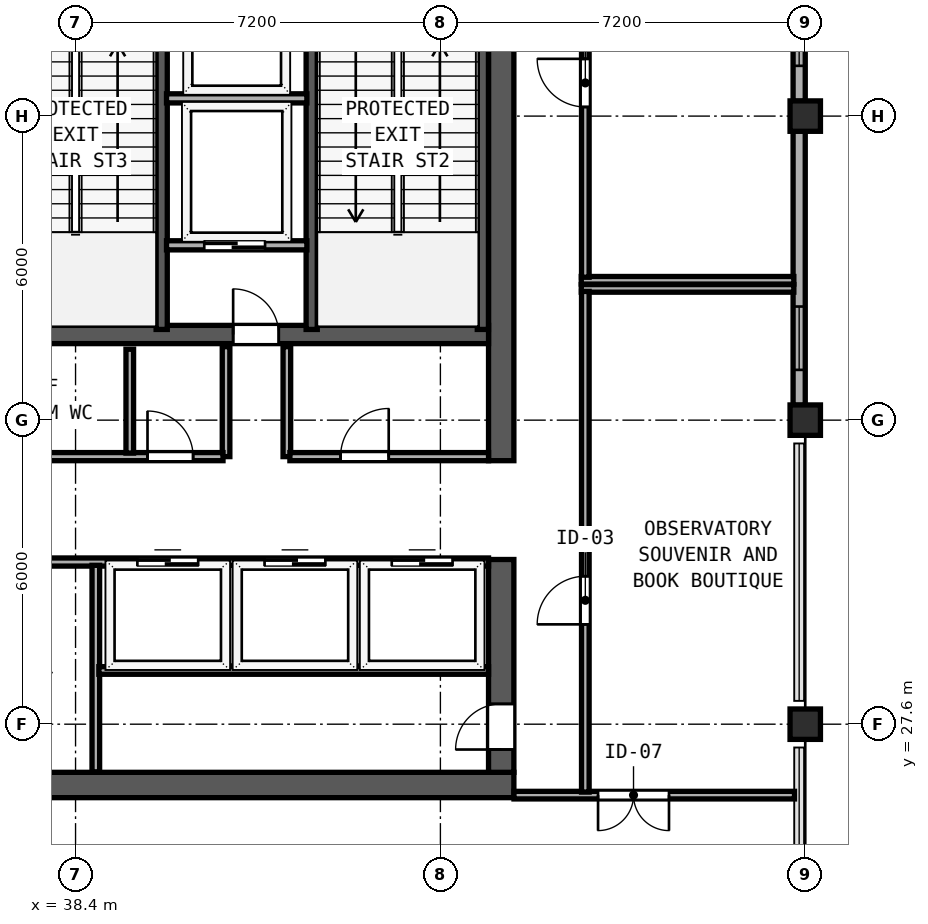
"""IFC4 building model, lengths in metres.
Left out: names, types, materials, properties, quantities, classifications, styles, units other than length and angle.
Written with IfcOpenShell. Run it as: python <this file> out.ifc"""

import sys

from ifc_helpers import new_model, si_unit, direction, frame, frame_2d, origin, origin_2d, place, context, subcontext, project, spatial, rectangle, hollow_rectangle, extrude, element, fill, save


model = new_model("IFC4")
c1 = context("Model", 3, precision=1e-05, world=origin(), true_north=direction((0.0, 1.0)))
c2 = subcontext(c1, "Body", "Model", "MODEL_VIEW")
j1 = project(units=[si_unit("LENGTHUNIT", "METRE"), si_unit("PLANEANGLEUNIT", "RADIAN")], contexts=[c1])
p1 = place(None, origin())
s1 = spatial("IfcSite", under=j1, at=p1, CompositionType="ELEMENT")
p2 = place(p1, origin())
s2 = spatial("IfcBuilding", under=s1, at=p2, CompositionType="ELEMENT")
p3 = place(p2, frame((0.0, 0.0, 318.2)))
s3 = spatial("IfcBuildingStorey", under=s2, at=p3, CompositionType="ELEMENT", Elevation=318.2)
p4 = place(p3, frame((29.75, 26.4, 0.0), z_axis=(0.0, 0.0, 1.0), x_axis=(1.0, 0.0, 0.0)))
e1 = element("IfcWall", 1, at=p4, inside=s3, PredefinedType="SHEAR", context=c2, shape_type="SweptSolid", body=[
    extrude(rectangle(XDim=17.3, YDim=0.5, at=frame_2d((8.65, 0.0))), origin(), (0.0, 0.0, 1.0), 4.76),
])
p5 = place(p3, frame((46.8, 26.65, 0.0), z_axis=(0.0, 0.0, 1.0), x_axis=(0.0, 1.0, 0.0)))
e2 = element("IfcWall", 2, at=p5, inside=s3, PredefinedType="SHEAR", context=c2, shape_type="SweptSolid", body=[
    extrude(rectangle(XDim=4.2, YDim=0.5, at=frame_2d((2.1, 0.0))), origin(), (0.0, 0.0, 1.0), 4.76),
])
p6 = place(p5, frame((1.35, 0.0, 0.0), z_axis=(0.0, 0.0, 1.0), x_axis=(-1.0, 0.0, 0.0)))
e3 = element("IfcOpeningElement", 3, at=p6, cuts=e2, PredefinedType="OPENING", context=c2, shape_type="SweptSolid", body=[
    extrude(rectangle(XDim=0.9, YDim=2.1, at=frame_2d((0.45, 1.05))), frame((0.0, 0.26, 0.0), z_axis=(0.0, -1.0, 0.0), x_axis=(1.0, 0.0, 0.0)), (0.0, 0.0, 1.0), 0.52),
])
p7 = place(p3, frame((46.8, 32.8, 0.0), z_axis=(0.0, 0.0, 1.0), x_axis=(0.0, 1.0, 0.0)))
e4 = element("IfcWall", 4, at=p7, inside=s3, PredefinedType="SHEAR", context=c2, shape_type="SweptSolid", body=[
    extrude(rectangle(XDim=10.15, YDim=0.5, at=frame_2d((5.075, 0.0))), origin(), (0.0, 0.0, 1.0), 4.76),
])
p8 = place(p3, frame((30.25, 35.29, 0.0), z_axis=(0.0, 0.0, 1.0), x_axis=(1.0, 0.0, 0.0)))
e5 = element("IfcWall", 5, at=p8, inside=s3, PredefinedType="SHEAR", context=c2, shape_type="SweptSolid", body=[
    extrude(rectangle(XDim=16.3, YDim=0.36, at=frame_2d((8.15, 0.0))), origin(), (0.0, 0.0, 1.0), 4.76),
])
p9 = place(p8, frame((5.1, 0.0, 0.0), z_axis=(0.0, 0.0, 1.0), x_axis=(-1.0, 0.0, 0.0)))
e6 = element("IfcOpeningElement", 6, at=p9, cuts=e5, PredefinedType="OPENING", context=c2, shape_type="SweptSolid", body=[
    extrude(rectangle(XDim=0.9, YDim=2.1, at=frame_2d((0.45, 1.05))), frame((0.0, 0.19, 0.0), z_axis=(0.0, -1.0, 0.0), x_axis=(1.0, 0.0, 0.0)), (0.0, 0.0, 1.0), 0.38),
])
p10 = place(p8, frame((12.16, 0.0, 0.0), z_axis=(0.0, 0.0, 1.0), x_axis=(-1.0, 0.0, 0.0)))
e7 = element("IfcOpeningElement", 7, at=p10, cuts=e5, PredefinedType="OPENING", context=c2, shape_type="SweptSolid", body=[
    extrude(rectangle(XDim=0.9, YDim=2.1, at=frame_2d((0.45, 1.05))), frame((0.0, 0.19, 0.0), z_axis=(0.0, -1.0, 0.0), x_axis=(1.0, 0.0, 0.0)), (0.0, 0.0, 1.0), 0.38),
])
for number, where, z_axis, x_axis in (
    (8, (40.1, 35.39, 0.0), (0.0, 0.0, 1.0), (0.0, 1.0, 0.0)),
    (9, (43.06, 35.39, 0.0), (0.0, 0.0, 1.0), (0.0, 1.0, 0.0)),
    (10, (46.438, 35.39, 0.0), (0.0, 0.0, 1.0), (0.0, 1.0, 0.0)),
):
    element("IfcWall", number, at=place(p3, frame(where, z_axis=z_axis, x_axis=x_axis)), inside=s3, PredefinedType="SHEAR", context=c2, shape_type="SweptSolid", body=[
        extrude(rectangle(XDim=7.56, YDim=0.22, at=frame_2d((3.78, 0.0))), origin(), (0.0, 0.0, 1.0), 4.76),
    ])
for number, where, z_axis, x_axis in (
    (11, (52.8, 33.6, 0.0), (0.0, 0.0, 1.0), (1.0, 0.0, 0.0)),
    (12, (52.8, 27.6, 0.0), (0.0, 0.0, 1.0), (1.0, 0.0, 0.0)),
    (13, (52.8, 39.6, 0.0), (0.0, 0.0, 1.0), (1.0, 0.0, 0.0)),
):
    element("IfcColumn", number, at=place(p3, frame(where, z_axis=z_axis, x_axis=x_axis)), inside=s3, PredefinedType="COLUMN", context=c2, shape_type="SweptSolid", body=[
        extrude(hollow_rectangle(XDim=0.6, YDim=0.6, WallThickness=0.024, at=origin_2d()), origin(), (0.0, 0.0, 1.0), 5.0),
    ])
p11 = place(p3, frame((52.68, 33.892, 0.0), z_axis=(0.0, 0.0, 1.0), x_axis=(0.0, 1.0, 0.0)))
e14 = element("IfcWall", 14, at=p11, inside=s3, PredefinedType="SOLIDWALL", context=c2, shape_type="SweptSolid", body=[
    extrude(rectangle(XDim=5.416, YDim=0.24, at=frame_2d((2.708, 0.0))), origin(), (0.0, 0.0, 1.0), 4.355),
])
p12 = place(p11, frame((0.7, 0.0, 0.85)))
e15 = element("IfcOpeningElement", 15, at=p12, cuts=e14, PredefinedType="OPENING", context=c2, shape_type="SweptSolid", body=[
    extrude(rectangle(XDim=1.25, YDim=1.95, at=frame_2d((0.625, 0.975))), frame((0.0, 0.13, 0.0), z_axis=(0.0, -1.0, 0.0), x_axis=(1.0, 0.0, 0.0)), (0.0, 0.0, 1.0), 0.26),
])
p13 = place(p3, frame((52.68, 39.892, 0.0), z_axis=(0.0, 0.0, 1.0), x_axis=(0.0, 1.0, 0.0)))
e16 = element("IfcWall", 16, at=p13, inside=s3, PredefinedType="SOLIDWALL", context=c2, shape_type="SweptSolid", body=[
    extrude(rectangle(XDim=5.416, YDim=0.24, at=frame_2d((2.708, 0.0))), origin(), (0.0, 0.0, 1.0), 4.355),
])
p14 = place(p13, frame((0.7, 0.0, 0.85)))
e17 = element("IfcOpeningElement", 17, at=p14, cuts=e16, PredefinedType="OPENING", context=c2, shape_type="SweptSolid", body=[
    extrude(rectangle(XDim=1.25, YDim=1.95, at=frame_2d((0.625, 0.975))), frame((0.0, 0.13, 0.0), z_axis=(0.0, -1.0, 0.0), x_axis=(1.0, 0.0, 0.0)), (0.0, 0.0, 1.0), 0.26),
])
p15 = place(p3, frame((40.195, 39.95, 0.0), z_axis=(0.0, 0.0, 1.0), x_axis=(1.0, 0.0, 0.0)))
e18 = element("IfcWall", 18, at=p15, inside=s3, PredefinedType="SOLIDWALL", context=c2, shape_type="SweptSolid", body=[
    extrude(rectangle(XDim=2.77, YDim=0.18, at=frame_2d((1.385, 0.0))), origin(), (0.0, 0.0, 1.0), 4.76),
])
p16 = place(p3, frame((40.195, 37.05, 0.0), z_axis=(0.0, 0.0, 1.0), x_axis=(1.0, 0.0, 0.0)))
e19 = element("IfcWall", 19, at=p16, inside=s3, PredefinedType="SOLIDWALL", context=c2, shape_type="SweptSolid", body=[
    extrude(rectangle(XDim=2.77, YDim=0.18, at=frame_2d((1.385, 0.0))), origin(), (0.0, 0.0, 1.0), 4.76),
])
p17 = place(p16, frame((1.945, 0.0, 0.0), z_axis=(0.0, 0.0, 1.0), x_axis=(-1.0, 0.0, 0.0)))
e20 = element("IfcOpeningElement", 20, at=p17, cuts=e19, PredefinedType="OPENING", context=c2, shape_type="SweptSolid", body=[
    extrude(rectangle(XDim=1.2, YDim=2.2, at=frame_2d((0.6, 1.1))), frame((0.0, 0.1, 0.0), z_axis=(0.0, -1.0, 0.0), x_axis=(1.0, 0.0, 0.0)), (0.0, 0.0, 1.0), 0.2),
])
for number, where, z_axis, x_axis in (
    (21, (41.37, 32.88, 0.0), (0.0, 0.0, 1.0), (0.0, 1.0, 0.0)),
    (22, (42.57, 32.88, 0.0), (0.0, 0.0, 1.0), (0.0, 1.0, 0.0)),
):
    element("IfcWall", number, at=place(p3, frame(where, z_axis=z_axis, x_axis=x_axis)), inside=s3, PredefinedType="SOLIDWALL", context=c2, shape_type="SweptSolid", body=[
        extrude(rectangle(XDim=2.17, YDim=0.15, at=frame_2d((1.085, 0.0))), origin(), (0.0, 0.0, 1.0), 4.76),
    ])
p18 = place(p3, frame((35.57, 32.88, 0.0), z_axis=(0.0, 0.0, 1.0), x_axis=(1.0, 0.0, 0.0)))
e23 = element("IfcWall", 23, at=p18, inside=s3, PredefinedType="SOLIDWALL", context=c2, shape_type="SweptSolid", body=[
    extrude(rectangle(XDim=5.74, YDim=0.16, at=frame_2d((2.87, 0.0))), origin(), (0.0, 0.0, 1.0), 4.76),
])
p19 = place(p18, frame((1.49, 0.0, 0.0), z_axis=(0.0, 0.0, 1.0), x_axis=(-1.0, 0.0, 0.0)))
e24 = element("IfcOpeningElement", 24, at=p19, cuts=e23, PredefinedType="OPENING", context=c2, shape_type="SweptSolid", body=[
    extrude(rectangle(XDim=0.95, YDim=2.12, at=frame_2d((0.475, 1.06))), frame((0.0, 0.09, 0.0), z_axis=(0.0, -1.0, 0.0), x_axis=(1.0, 0.0, 0.0)), (0.0, 0.0, 1.0), 0.18),
])
p20 = place(p18, frame((5.15, 0.0, 0.0), z_axis=(0.0, 0.0, 1.0), x_axis=(-1.0, 0.0, 0.0)))
e25 = element("IfcOpeningElement", 25, at=p20, cuts=e23, PredefinedType="OPENING", context=c2, shape_type="SweptSolid", body=[
    extrude(rectangle(XDim=0.9, YDim=2.1, at=frame_2d((0.45, 1.05))), frame((0.0, 0.09, 0.0), z_axis=(0.0, -1.0, 0.0), x_axis=(1.0, 0.0, 0.0)), (0.0, 0.0, 1.0), 0.18),
])
p21 = place(p3, frame((42.63, 32.88, 0.0), z_axis=(0.0, 0.0, 1.0), x_axis=(1.0, 0.0, 0.0)))
e26 = element("IfcWall", 26, at=p21, inside=s3, PredefinedType="SOLIDWALL", context=c2, shape_type="SweptSolid", body=[
    extrude(rectangle(XDim=3.92, YDim=0.16, at=frame_2d((1.96, 0.0))), origin(), (0.0, 0.0, 1.0), 4.76),
])
p22 = place(p21, frame((1.95, 0.0, 0.0), z_axis=(0.0, 0.0, 1.0), x_axis=(-1.0, 0.0, 0.0)))
e27 = element("IfcOpeningElement", 27, at=p22, cuts=e26, PredefinedType="OPENING", context=c2, shape_type="SweptSolid", body=[
    extrude(rectangle(XDim=0.95, YDim=2.12, at=frame_2d((0.475, 1.06))), frame((0.0, 0.09, 0.0), z_axis=(0.0, -1.0, 0.0), x_axis=(1.0, 0.0, 0.0)), (0.0, 0.0, 1.0), 0.18),
])
p23 = place(p3, frame((39.47, 32.95, 0.0), z_axis=(0.0, 0.0, 1.0), x_axis=(0.0, 1.0, 0.0)))
e28 = element("IfcWall", 28, at=p23, inside=s3, PredefinedType="SOLIDWALL", context=c2, shape_type="SweptSolid", body=[
    extrude(rectangle(XDim=2.05, YDim=0.15, at=frame_2d((1.025, 0.0))), origin(), (0.0, 0.0, 1.0), 4.76),
])
p24 = place(p3, frame((30.25, 30.8, 0.0), z_axis=(0.0, 0.0, 1.0), x_axis=(1.0, 0.0, 0.0)))
e29 = element("IfcWall", 29, at=p24, inside=s3, PredefinedType="SOLIDWALL", context=c2, shape_type="SweptSolid", body=[
    extrude(rectangle(XDim=16.3, YDim=0.16, at=frame_2d((8.15, 0.0))), origin(), (0.0, 0.0, 1.0), 4.76),
])
p25 = place(p24, frame((0.75, 0.0, 0.0)))
e30 = element("IfcOpeningElement", 30, at=p25, cuts=e29, PredefinedType="OPENING", context=c2, shape_type="SweptSolid", body=[
    extrude(rectangle(XDim=0.95, YDim=2.12, at=frame_2d((0.475, 1.06))), frame((0.0, 0.09, 0.0), z_axis=(0.0, -1.0, 0.0), x_axis=(1.0, 0.0, 0.0)), (0.0, 0.0, 1.0), 0.18),
])
p26 = place(p24, frame((3.4, 0.0, 0.0)))
e31 = element("IfcOpeningElement", 31, at=p26, cuts=e29, PredefinedType="OPENING", context=c2, shape_type="SweptSolid", body=[
    extrude(rectangle(XDim=0.95, YDim=2.12, at=frame_2d((0.475, 1.06))), frame((0.0, 0.09, 0.0), z_axis=(0.0, -1.0, 0.0), x_axis=(1.0, 0.0, 0.0)), (0.0, 0.0, 1.0), 0.18),
])
p27 = place(p24, frame((6.25, 0.0, 0.0)))
e32 = element("IfcOpeningElement", 32, at=p27, cuts=e29, PredefinedType="OPENING", context=c2, shape_type="SweptSolid", body=[
    extrude(rectangle(XDim=0.95, YDim=2.12, at=frame_2d((0.475, 1.06))), frame((0.0, 0.09, 0.0), z_axis=(0.0, -1.0, 0.0), x_axis=(1.0, 0.0, 0.0)), (0.0, 0.0, 1.0), 0.18),
])
p28 = place(p24, frame((9.37, 0.0, 0.0)))
e33 = element("IfcOpeningElement", 33, at=p28, cuts=e29, PredefinedType="OPENING", context=c2, shape_type="SweptSolid", body=[
    extrude(rectangle(XDim=1.2, YDim=2.2, at=frame_2d((0.6, 1.1))), frame((0.0, 0.09, 0.0), z_axis=(0.0, -1.0, 0.0), x_axis=(1.0, 0.0, 0.0)), (0.0, 0.0, 1.0), 0.18),
])
p29 = place(p24, frame((11.88, 0.0, 0.0)))
e34 = element("IfcOpeningElement", 34, at=p29, cuts=e29, PredefinedType="OPENING", context=c2, shape_type="SweptSolid", body=[
    extrude(rectangle(XDim=1.2, YDim=2.2, at=frame_2d((0.6, 1.1))), frame((0.0, 0.09, 0.0), z_axis=(0.0, -1.0, 0.0), x_axis=(1.0, 0.0, 0.0)), (0.0, 0.0, 1.0), 0.18),
])
p30 = place(p24, frame((14.39, 0.0, 0.0)))
e35 = element("IfcOpeningElement", 35, at=p30, cuts=e29, PredefinedType="OPENING", context=c2, shape_type="SweptSolid", body=[
    extrude(rectangle(XDim=1.2, YDim=2.2, at=frame_2d((0.6, 1.1))), frame((0.0, 0.09, 0.0), z_axis=(0.0, -1.0, 0.0), x_axis=(1.0, 0.0, 0.0)), (0.0, 0.0, 1.0), 0.18),
])
p31 = place(p3, frame((38.8, 26.66, 0.0), z_axis=(0.0, 0.0, 1.0), x_axis=(0.0, 1.0, 0.0)))
e36 = element("IfcWall", 36, at=p31, inside=s3, PredefinedType="SOLIDWALL", context=c2, shape_type="SweptSolid", body=[
    extrude(rectangle(XDim=4.075, YDim=0.15, at=frame_2d((2.038, 0.0))), origin(), (0.0, 0.0, 1.0), 4.76),
])
p32 = place(p3, frame((38.86, 28.66, 0.0), z_axis=(0.0, 0.0, 1.0), x_axis=(1.0, 0.0, 0.0)))
e37 = element("IfcWall", 37, at=p32, inside=s3, PredefinedType="PARTITIONING", context=c2, shape_type="SweptSolid", body=[
    extrude(rectangle(XDim=7.69, YDim=0.15, at=frame_2d((3.845, 0.0))), origin(), (0.0, 0.0, 1.0), 4.76),
])
for number, where, z_axis, x_axis in (
    (38, (41.47, 28.75, 0.0), (0.0, 0.0, 1.0), (0.0, 1.0, 0.0)),
    (39, (43.98, 28.75, 0.0), (0.0, 0.0, 1.0), (0.0, 1.0, 0.0)),
):
    element("IfcWall", number, at=place(p3, frame(where, z_axis=z_axis, x_axis=x_axis)), inside=s3, PredefinedType="SOLIDWALL", context=c2, shape_type="SweptSolid", body=[
        extrude(rectangle(XDim=1.985, YDim=0.15, at=frame_2d((0.993, 0.0))), origin(), (0.0, 0.0, 1.0), 4.76),
    ])
p33 = place(p3, frame((47.052, 26.2, 0.0), z_axis=(0.0, 0.0, 1.0), x_axis=(1.0, 0.0, 0.0)))
e40 = element("IfcWall", 40, at=p33, inside=s3, PredefinedType="PARTITIONING", context=c2, shape_type="SweptSolid", body=[
    extrude(rectangle(XDim=5.536, YDim=0.15, at=frame_2d((2.768, 0.0))), origin(), (0.0, 0.0, 1.0), 4.76),
])
p34 = place(p33, frame((3.059, 0.0, 0.0), z_axis=(0.0, 0.0, 1.0), x_axis=(-1.0, 0.0, 0.0)))
e41 = element("IfcOpeningElement", 41, at=p34, cuts=e40, PredefinedType="OPENING", context=c2, shape_type="SweptSolid", body=[
    extrude(rectangle(XDim=1.4, YDim=2.18, at=frame_2d((0.7, 1.09))), frame((0.0, 0.085, 0.0), z_axis=(0.0, -1.0, 0.0), x_axis=(1.0, 0.0, 0.0)), (0.0, 0.0, 1.0), 0.17),
])
p35 = place(p3, frame((48.38, 36.2, 0.0), z_axis=(0.0, 0.0, 1.0), x_axis=(1.0, 0.0, 0.0)))
e42 = element("IfcWall", 42, at=p35, inside=s3, PredefinedType="PARTITIONING", context=c2, shape_type="SweptSolid", body=[
    extrude(rectangle(XDim=4.195, YDim=0.15, at=frame_2d((2.098, 0.0))), origin(), (0.0, 0.0, 1.0), 4.76),
])
p36 = place(p3, frame((48.46, 26.26, 0.0), z_axis=(0.0, 0.0, 1.0), x_axis=(0.0, 1.0, 0.0)))
e43 = element("IfcWall", 43, at=p36, inside=s3, PredefinedType="PARTITIONING", context=c2, shape_type="SweptSolid", body=[
    extrude(rectangle(XDim=9.88, YDim=0.15, at=frame_2d((4.94, 0.0))), origin(), (0.0, 0.0, 1.0), 4.76),
])
p37 = place(p36, frame((3.31, 0.0, 0.0)))
e44 = element("IfcOpeningElement", 44, at=p37, cuts=e43, PredefinedType="OPENING", context=c2, shape_type="SweptSolid", body=[
    extrude(rectangle(XDim=0.95, YDim=2.12, at=frame_2d((0.475, 1.06))), frame((0.0, 0.085, 0.0), z_axis=(0.0, -1.0, 0.0), x_axis=(1.0, 0.0, 0.0)), (0.0, 0.0, 1.0), 0.17),
])
p38 = place(p3, frame((48.38, 36.36, 0.0), z_axis=(0.0, 0.0, 1.0), x_axis=(1.0, 0.0, 0.0)))
e45 = element("IfcWall", 45, at=p38, inside=s3, PredefinedType="PARTITIONING", context=c2, shape_type="SweptSolid", body=[
    extrude(rectangle(XDim=4.195, YDim=0.15, at=frame_2d((2.098, 0.0))), origin(), (0.0, 0.0, 1.0), 4.76),
])
p39 = place(p3, frame((48.46, 36.42, 0.0), z_axis=(0.0, 0.0, 1.0), x_axis=(0.0, 1.0, 0.0)))
e46 = element("IfcWall", 46, at=p39, inside=s3, PredefinedType="PARTITIONING", context=c2, shape_type="SweptSolid", body=[
    extrude(rectangle(XDim=11.2, YDim=0.15, at=frame_2d((5.6, 0.0))), origin(), (0.0, 0.0, 1.0), 4.76),
])
p40 = place(p39, frame((3.36, 0.0, 0.0)))
e47 = element("IfcOpeningElement", 47, at=p40, cuts=e46, PredefinedType="OPENING", context=c2, shape_type="SweptSolid", body=[
    extrude(rectangle(XDim=0.95, YDim=2.12, at=frame_2d((0.475, 1.06))), frame((0.0, 0.085, 0.0), z_axis=(0.0, -1.0, 0.0), x_axis=(1.0, 0.0, 0.0)), (0.0, 0.0, 1.0), 0.17),
])
p41 = place(p12, origin())
e48 = element("IfcWindow", 48, at=p41, inside=s3, PartitioningType="SINGLE_PANEL", PredefinedType="WINDOW", context=c2, shape_type="SweptSolid", body=[
    extrude(rectangle(XDim=1.25, YDim=1.95, at=frame_2d((0.625, 0.975))), frame((0.0, 0.03, 0.0), z_axis=(0.0, -1.0, 0.0), x_axis=(1.0, 0.0, 0.0)), (0.0, 0.0, 1.0), 0.06),
])
fill(e15, e48)
p42 = place(p14, origin())
e49 = element("IfcWindow", 49, at=p42, inside=s3, PartitioningType="SINGLE_PANEL", PredefinedType="WINDOW", context=c2, shape_type="SweptSolid", body=[
    extrude(rectangle(XDim=1.25, YDim=1.95, at=frame_2d((0.625, 0.975))), frame((0.0, 0.03, 0.0), z_axis=(0.0, -1.0, 0.0), x_axis=(1.0, 0.0, 0.0)), (0.0, 0.0, 1.0), 0.06),
])
fill(e17, e49)
p43 = place(p17, origin())
e50 = element("IfcDoor", 50, at=p43, inside=s3, OperationType="SLIDING_TO_RIGHT", PredefinedType="DOOR", context=c2, shape_type="SweptSolid", body=[
    extrude(rectangle(XDim=1.2, YDim=2.2, at=frame_2d((0.6, 1.1))), frame((0.0, 0.025, 0.0), z_axis=(0.0, -1.0, 0.0), x_axis=(1.0, 0.0, 0.0)), (0.0, 0.0, 1.0), 0.05),
])
fill(e20, e50)
p44 = place(p10, origin())
e51 = element("IfcDoor", 51, at=p44, inside=s3, OperationType="SINGLE_SWING_RIGHT", PredefinedType="DOOR", context=c2, shape_type="SweptSolid", body=[
    extrude(rectangle(XDim=0.9, YDim=2.1, at=frame_2d((0.45, 1.05))), frame((0.0, 0.025, 0.0), z_axis=(0.0, -1.0, 0.0), x_axis=(1.0, 0.0, 0.0)), (0.0, 0.0, 1.0), 0.05),
])
fill(e7, e51)
p45 = place(p20, origin())
e52 = element("IfcDoor", 52, at=p45, inside=s3, OperationType="SINGLE_SWING_RIGHT", PredefinedType="DOOR", context=c2, shape_type="SweptSolid", body=[
    extrude(rectangle(XDim=0.9, YDim=2.1, at=frame_2d((0.45, 1.05))), frame((0.0, 0.025, 0.0), z_axis=(0.0, -1.0, 0.0), x_axis=(1.0, 0.0, 0.0)), (0.0, 0.0, 1.0), 0.05),
])
fill(e25, e52)
p46 = place(p22, origin())
e53 = element("IfcDoor", 53, at=p46, inside=s3, OperationType="SINGLE_SWING_LEFT", PredefinedType="DOOR", context=c2, shape_type="SweptSolid", body=[
    extrude(rectangle(XDim=0.95, YDim=2.12, at=frame_2d((0.475, 1.06))), frame((0.0, 0.025, 0.0), z_axis=(0.0, -1.0, 0.0), x_axis=(1.0, 0.0, 0.0)), (0.0, 0.0, 1.0), 0.05),
])
fill(e27, e53)
p47 = place(p6, origin())
e54 = element("IfcDoor", 54, at=p47, inside=s3, OperationType="SINGLE_SWING_RIGHT", PredefinedType="DOOR", context=c2, shape_type="SweptSolid", body=[
    extrude(rectangle(XDim=0.9, YDim=2.1, at=frame_2d((0.45, 1.05))), frame((0.0, -0.135, 0.0), z_axis=(0.0, -1.0, 0.0), x_axis=(1.0, 0.0, 0.0)), (0.0, 0.0, 1.0), 0.05),
])
fill(e3, e54)
p48 = place(p28, origin())
e55 = element("IfcDoor", 55, at=p48, inside=s3, OperationType="SLIDING_TO_RIGHT", PredefinedType="DOOR", context=c2, shape_type="SweptSolid", body=[
    extrude(rectangle(XDim=1.2, YDim=2.2, at=frame_2d((0.6, 1.1))), frame((0.0, 0.025, 0.0), z_axis=(0.0, -1.0, 0.0), x_axis=(1.0, 0.0, 0.0)), (0.0, 0.0, 1.0), 0.05),
])
fill(e33, e55)
p49 = place(p29, origin())
e56 = element("IfcDoor", 56, at=p49, inside=s3, OperationType="SLIDING_TO_RIGHT", PredefinedType="DOOR", context=c2, shape_type="SweptSolid", body=[
    extrude(rectangle(XDim=1.2, YDim=2.2, at=frame_2d((0.6, 1.1))), frame((0.0, 0.025, 0.0), z_axis=(0.0, -1.0, 0.0), x_axis=(1.0, 0.0, 0.0)), (0.0, 0.0, 1.0), 0.05),
])
fill(e34, e56)
p50 = place(p30, origin())
e57 = element("IfcDoor", 57, at=p50, inside=s3, OperationType="SLIDING_TO_RIGHT", PredefinedType="DOOR", context=c2, shape_type="SweptSolid", body=[
    extrude(rectangle(XDim=1.2, YDim=2.2, at=frame_2d((0.6, 1.1))), frame((0.0, 0.025, 0.0), z_axis=(0.0, -1.0, 0.0), x_axis=(1.0, 0.0, 0.0)), (0.0, 0.0, 1.0), 0.05),
])
fill(e35, e57)
p51 = place(p34, origin())
e58 = element("IfcDoor", 58, at=p51, inside=s3, OperationType="DOUBLE_DOOR_SINGLE_SWING", PredefinedType="DOOR", context=c2, shape_type="SweptSolid", body=[
    extrude(rectangle(XDim=1.4, YDim=2.18, at=frame_2d((0.7, 1.09))), frame((0.0, 0.025, 0.0), z_axis=(0.0, -1.0, 0.0), x_axis=(1.0, 0.0, 0.0)), (0.0, 0.0, 1.0), 0.05),
])
fill(e41, e58)
p52 = place(p37, origin())
e59 = element("IfcDoor", 59, at=p52, inside=s3, OperationType="SINGLE_SWING_LEFT", PredefinedType="DOOR", context=c2, shape_type="SweptSolid", body=[
    extrude(rectangle(XDim=0.95, YDim=2.12, at=frame_2d((0.475, 1.06))), frame((0.0, 0.025, 0.0), z_axis=(0.0, -1.0, 0.0), x_axis=(1.0, 0.0, 0.0)), (0.0, 0.0, 1.0), 0.05),
])
fill(e44, e59)
p53 = place(p40, origin())
e60 = element("IfcDoor", 60, at=p53, inside=s3, OperationType="SINGLE_SWING_RIGHT", PredefinedType="DOOR", context=c2, shape_type="SweptSolid", body=[
    extrude(rectangle(XDim=0.95, YDim=2.12, at=frame_2d((0.475, 1.06))), frame((0.0, 0.025, 0.0), z_axis=(0.0, -1.0, 0.0), x_axis=(1.0, 0.0, 0.0)), (0.0, 0.0, 1.0), 0.05),
])
fill(e47, e60)
save(model, sys.argv[1])
